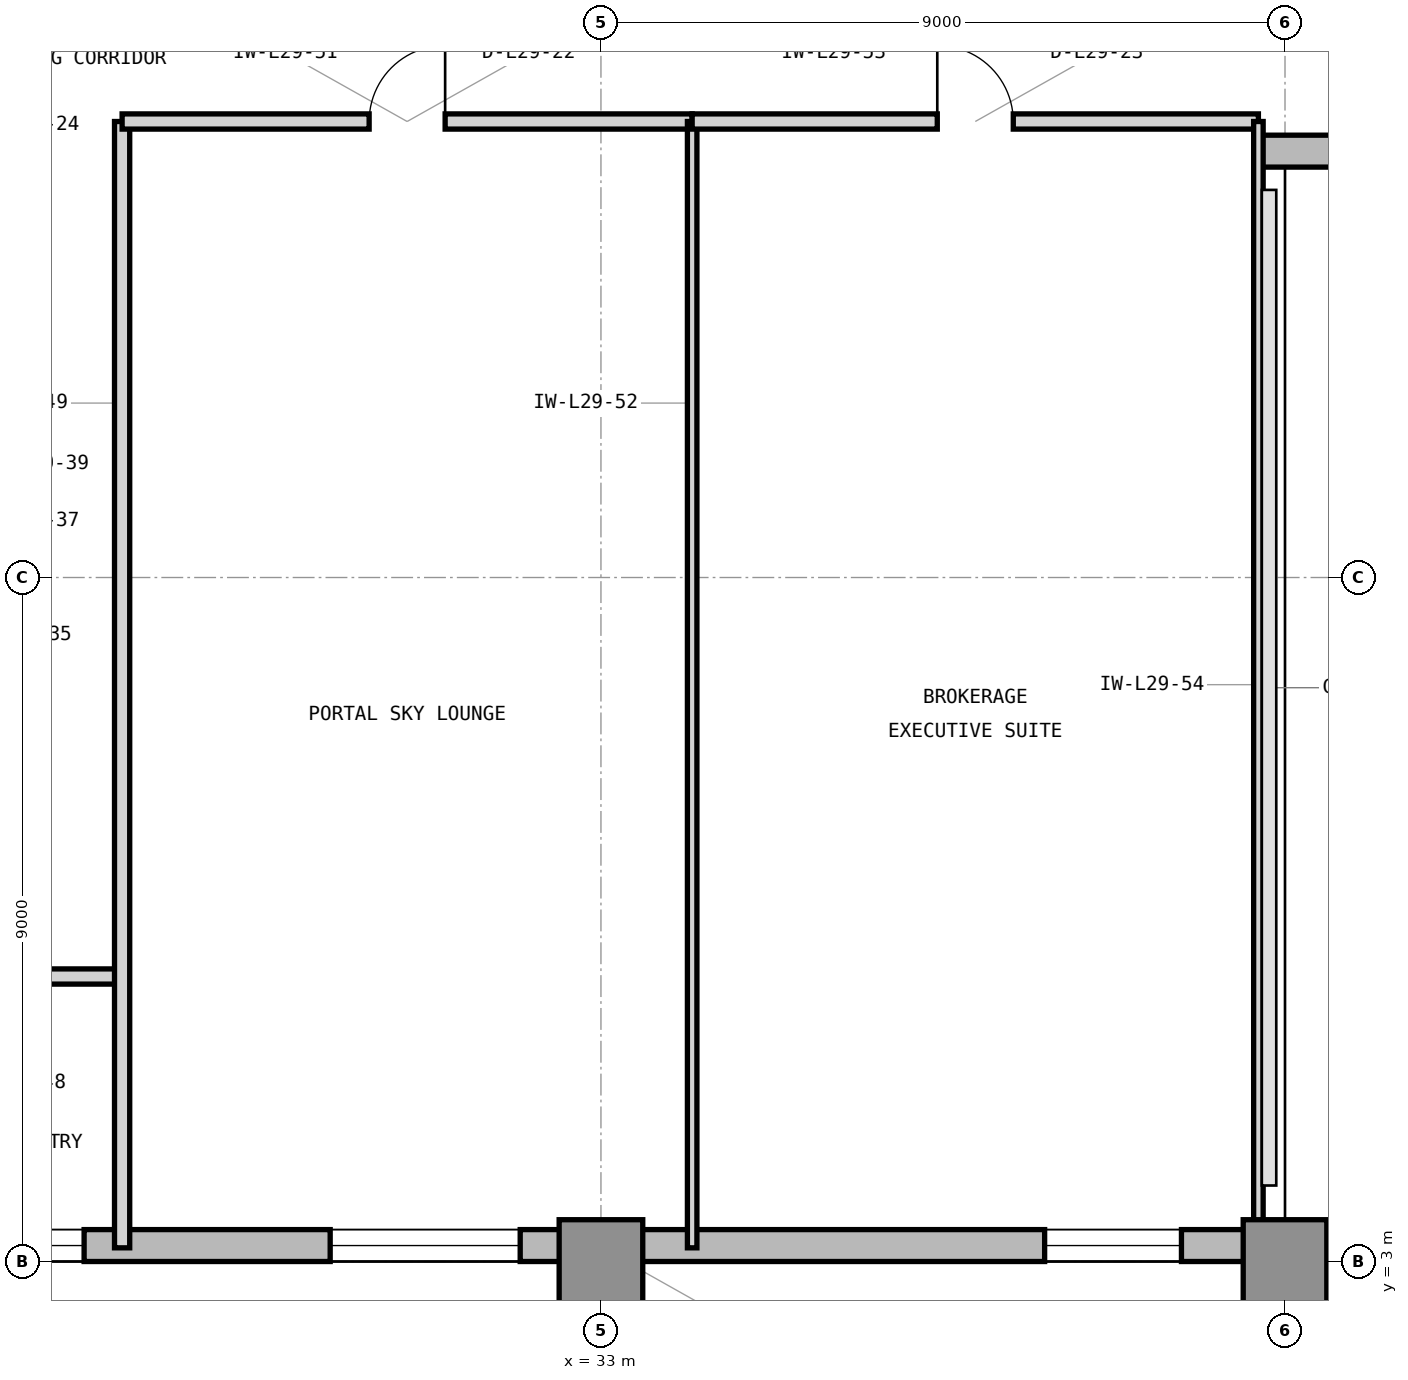
"""IFC4 building model, lengths in metres.
Left out: names, types, materials, properties, quantities, classifications, styles, units other than length and angle.
Written with IfcOpenShell. Run it as: python <this file> out.ifc"""

import sys

from ifc_helpers import new_model, si_unit, direction, frame, frame_2d, origin, origin_2d, place, context, subcontext, project, spatial, rectangle, extrude, element, fill, save


model = new_model("IFC4")
c1 = context("Model", 3, precision=1e-05, world=origin(), true_north=direction((0.0, 1.0)))
c2 = subcontext(c1, "Body", "Model", "MODEL_VIEW")
j1 = project(units=[si_unit("LENGTHUNIT", "METRE"), si_unit("PLANEANGLEUNIT", "RADIAN")], contexts=[c1])
p1 = place(None, origin())
s1 = spatial("IfcSite", under=j1, at=p1, CompositionType="ELEMENT")
p2 = place(p1, origin())
s2 = spatial("IfcBuilding", under=s1, at=p2, CompositionType="ELEMENT")
p3 = place(p2, frame((0.0, 0.0, 124.5)))
s3 = spatial("IfcBuildingStorey", under=s2, at=p3, CompositionType="ELEMENT", Elevation=124.5)
for number, where, z_axis, x_axis in (
    (1, (33.0, 3.0, 0.0), (0.0, 0.0, 1.0), (1.0, 0.0, 0.0)),
    (2, (42.0, 3.0, 0.0), (0.0, 0.0, 1.0), (1.0, 0.0, 0.0)),
):
    element("IfcColumn", number, at=place(p3, frame(where, z_axis=z_axis, x_axis=x_axis)), inside=s3, PredefinedType="COLUMN", context=c2, shape_type="SweptSolid", body=[
        extrude(rectangle(XDim=1.1, YDim=1.1, at=origin_2d()), origin(), (0.0, 0.0, 1.0), 3.9),
    ])
p4 = place(p3, frame((23.9, 3.21, 0.0), z_axis=(0.0, 0.0, 1.0), x_axis=(1.0, 0.0, 0.0)))
e3 = element("IfcWall", 3, at=p4, inside=s3, PredefinedType="STANDARD", context=c2, shape_type="SweptSolid", body=[
    extrude(rectangle(XDim=18.1, YDim=0.42, at=frame_2d((9.05, 0.0))), origin(), (0.0, 0.0, 1.0), 3.7),
])
p5 = place(p4, frame((5.538, 0.0, 0.85)))
e4 = element("IfcOpeningElement", 4, at=p5, cuts=e3, PredefinedType="OPENING", context=c2, shape_type="SweptSolid", body=[
    extrude(rectangle(XDim=2.5, YDim=2.25, at=frame_2d((1.25, 1.125))), frame((0.0, 0.22, 0.0), z_axis=(0.0, -1.0, 0.0), x_axis=(1.0, 0.0, 0.0)), (0.0, 0.0, 1.0), 0.44),
])
p6 = place(p4, frame((14.938, 0.0, 0.85)))
e5 = element("IfcOpeningElement", 5, at=p6, cuts=e3, PredefinedType="OPENING", context=c2, shape_type="SweptSolid", body=[
    extrude(rectangle(XDim=1.8, YDim=2.25, at=frame_2d((0.9, 1.125))), frame((0.0, 0.22, 0.0), z_axis=(0.0, -1.0, 0.0), x_axis=(1.0, 0.0, 0.0)), (0.0, 0.0, 1.0), 0.44),
])
p7 = place(p4, frame((1.1, 0.0, 0.85)))
e6 = element("IfcOpeningElement", 6, at=p7, cuts=e3, PredefinedType="OPENING", context=c2, shape_type="SweptSolid", body=[
    extrude(rectangle(XDim=1.2, YDim=2.25, at=frame_2d((0.6, 1.125))), frame((0.0, 0.22, 0.0), z_axis=(0.0, -1.0, 0.0), x_axis=(1.0, 0.0, 0.0)), (0.0, 0.0, 1.0), 0.44),
])
p8 = place(p3, frame((41.7, 17.61, 0.0), z_axis=(0.0, 0.0, 1.0), x_axis=(1.0, 0.0, 0.0)))
e7 = element("IfcWall", 7, at=p8, inside=s3, PredefinedType="STANDARD", context=c2, shape_type="SweptSolid", body=[
    extrude(rectangle(XDim=9.5, YDim=0.42, at=frame_2d((4.75, 0.0))), origin(), (0.0, 0.0, 1.0), 3.7),
])
p9 = place(p3, frame((23.85, 6.75, 0.0), z_axis=(0.0, 0.0, 1.0), x_axis=(1.0, 0.0, 0.0)))
e8 = element("IfcWall", 8, at=p9, inside=s3, PredefinedType="PARTITIONING", context=c2, shape_type="SweptSolid", body=[
    extrude(rectangle(XDim=2.85, YDim=0.2, at=frame_2d((1.425, 0.0))), origin(), (0.0, 0.0, 1.0), 3.69),
])
p10 = place(p9, frame((0.7, 0.0, 0.0)))
e9 = element("IfcOpeningElement", 9, at=p10, cuts=e8, PredefinedType="OPENING", context=c2, shape_type="SweptSolid", body=[
    extrude(rectangle(XDim=1.0, YDim=2.15, at=frame_2d((0.5, 1.075))), frame((0.0, 0.11, 0.0), z_axis=(0.0, -1.0, 0.0), x_axis=(1.0, 0.0, 0.0)), (0.0, 0.0, 1.0), 0.22),
])
p11 = place(p3, frame((26.7, 3.18, 0.0), z_axis=(0.0, 0.0, 1.0), x_axis=(0.0, 1.0, 0.0)))
e10 = element("IfcWall", 10, at=p11, inside=s3, PredefinedType="PARTITIONING", context=c2, shape_type="SweptSolid", body=[
    extrude(rectangle(XDim=14.82, YDim=0.2, at=frame_2d((7.41, 0.0))), origin(), (0.0, 0.0, 1.0), 3.69),
])
p12 = place(p3, frame((26.7, 18.0, 0.0), z_axis=(0.0, 0.0, 1.0), x_axis=(1.0, 0.0, 0.0)))
e11 = element("IfcWall", 11, at=p12, inside=s3, PredefinedType="PARTITIONING", context=c2, shape_type="SweptSolid", body=[
    extrude(rectangle(XDim=7.5, YDim=0.2, at=frame_2d((3.75, 0.0))), origin(), (0.0, 0.0, 1.0), 3.233),
])
p13 = place(p12, frame((3.25, 0.0, 0.0)))
e12 = element("IfcOpeningElement", 12, at=p13, cuts=e11, PredefinedType="OPENING", context=c2, shape_type="SweptSolid", body=[
    extrude(rectangle(XDim=1.0, YDim=2.15, at=frame_2d((0.5, 1.075))), frame((0.0, 0.11, 0.0), z_axis=(0.0, -1.0, 0.0), x_axis=(1.0, 0.0, 0.0)), (0.0, 0.0, 1.0), 0.22),
])
p14 = place(p3, frame((34.2, 3.18, 0.0), z_axis=(0.0, 0.0, 1.0), x_axis=(0.0, 1.0, 0.0)))
e13 = element("IfcWall", 13, at=p14, inside=s3, PredefinedType="PARTITIONING", context=c2, shape_type="SweptSolid", body=[
    extrude(rectangle(XDim=14.82, YDim=0.125, at=frame_2d((7.41, 0.0))), origin(), (0.0, 0.0, 1.0), 3.69),
])
p15 = place(p3, frame((34.2, 18.0, 0.0), z_axis=(0.0, 0.0, 1.0), x_axis=(1.0, 0.0, 0.0)))
e14 = element("IfcWall", 14, at=p15, inside=s3, PredefinedType="PARTITIONING", context=c2, shape_type="SweptSolid", body=[
    extrude(rectangle(XDim=7.45, YDim=0.2, at=frame_2d((3.725, 0.0))), origin(), (0.0, 0.0, 1.0), 3.233),
])
p16 = place(p15, frame((3.225, 0.0, 0.0)))
e15 = element("IfcOpeningElement", 15, at=p16, cuts=e14, PredefinedType="OPENING", context=c2, shape_type="SweptSolid", body=[
    extrude(rectangle(XDim=1.0, YDim=2.15, at=frame_2d((0.5, 1.075))), frame((0.0, 0.11, 0.0), z_axis=(0.0, -1.0, 0.0), x_axis=(1.0, 0.0, 0.0)), (0.0, 0.0, 1.0), 0.22),
])
p17 = place(p3, frame((41.65, 3.18, 0.0), z_axis=(0.0, 0.0, 1.0), x_axis=(0.0, 1.0, 0.0)))
e16 = element("IfcWall", 16, at=p17, inside=s3, PredefinedType="PARTITIONING", context=c2, shape_type="SweptSolid", body=[
    extrude(rectangle(XDim=14.82, YDim=0.125, at=frame_2d((7.41, 0.0))), origin(), (0.0, 0.0, 1.0), 3.69),
])
p18 = place(p5, origin())
e17 = element("IfcWindow", 17, at=p18, inside=s3, PartitioningType="SINGLE_PANEL", PredefinedType="WINDOW", context=c2, shape_type="SweptSolid", body=[
    extrude(rectangle(XDim=2.5, YDim=2.25, at=frame_2d((1.25, 1.125))), frame((0.0, 0.11, 0.0), z_axis=(0.0, -1.0, 0.0), x_axis=(1.0, 0.0, 0.0)), (0.0, 0.0, 1.0), 0.06),
])
fill(e4, e17)
p19 = place(p6, origin())
e18 = element("IfcWindow", 18, at=p19, inside=s3, PartitioningType="SINGLE_PANEL", PredefinedType="WINDOW", context=c2, shape_type="SweptSolid", body=[
    extrude(rectangle(XDim=1.8, YDim=2.25, at=frame_2d((0.9, 1.125))), frame((0.0, 0.11, 0.0), z_axis=(0.0, -1.0, 0.0), x_axis=(1.0, 0.0, 0.0)), (0.0, 0.0, 1.0), 0.06),
])
fill(e5, e18)
p20 = place(p13, origin())
e19 = element("IfcDoor", 19, at=p20, inside=s3, OperationType="SINGLE_SWING_RIGHT", PredefinedType="DOOR", context=c2, shape_type="SweptSolid", body=[
    extrude(rectangle(XDim=1.0, YDim=2.15, at=frame_2d((0.5, 1.075))), frame((0.0, 0.025, 0.0), z_axis=(0.0, -1.0, 0.0), x_axis=(1.0, 0.0, 0.0)), (0.0, 0.0, 1.0), 0.05),
])
fill(e12, e19)
p21 = place(p16, origin())
e20 = element("IfcDoor", 20, at=p21, inside=s3, OperationType="SINGLE_SWING_LEFT", PredefinedType="DOOR", context=c2, shape_type="SweptSolid", body=[
    extrude(rectangle(XDim=1.0, YDim=2.15, at=frame_2d((0.5, 1.075))), frame((0.0, 0.025, 0.0), z_axis=(0.0, -1.0, 0.0), x_axis=(1.0, 0.0, 0.0)), (0.0, 0.0, 1.0), 0.05),
])
fill(e15, e20)
p22 = place(p7, origin())
e21 = element("IfcWindow", 21, at=p22, inside=s3, PartitioningType="SINGLE_PANEL", PredefinedType="WINDOW", context=c2, shape_type="SweptSolid", body=[
    extrude(rectangle(XDim=1.2, YDim=2.25, at=frame_2d((0.6, 1.125))), frame((0.0, 0.11, 0.0), z_axis=(0.0, -1.0, 0.0), x_axis=(1.0, 0.0, 0.0)), (0.0, 0.0, 1.0), 0.06),
])
fill(e6, e21)
save(model, sys.argv[1])
